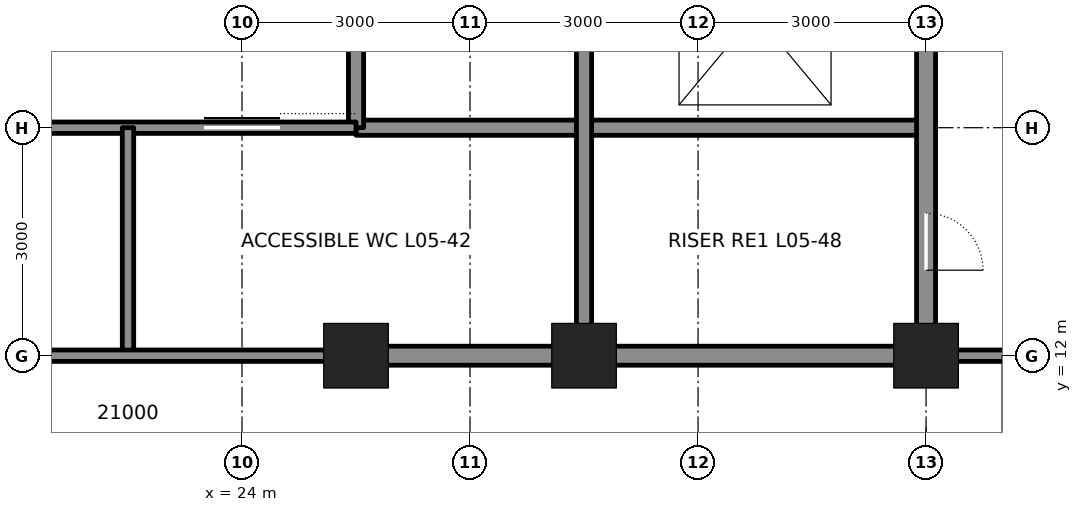
"""IFC4 building model, lengths in metres.
Left out: names, types, materials, properties, quantities, classifications, styles, units other than length and angle.
Written with IfcOpenShell. Run it as: python <this file> out.ifc"""

import sys

from ifc_helpers import new_model, si_unit, direction, frame, frame_2d, origin, origin_2d, place, context, subcontext, project, spatial, rectangle, hollow_rectangle, extrude, element, fill, save


model = new_model("IFC4")
c1 = context("Model", 3, precision=1e-05, world=origin(), true_north=direction((0.0, 1.0)))
c2 = subcontext(c1, "Body", "Model", "MODEL_VIEW")
j1 = project(units=[si_unit("LENGTHUNIT", "METRE"), si_unit("PLANEANGLEUNIT", "RADIAN")], contexts=[c1])
p1 = place(None, origin())
s1 = spatial("IfcSite", under=j1, at=p1, CompositionType="ELEMENT")
p2 = place(p1, origin())
s2 = spatial("IfcBuilding", under=s1, at=p2, CompositionType="ELEMENT")
p3 = place(p2, frame((0.0, 0.0, 28.8)))
s3 = spatial("IfcBuildingStorey", under=s2, at=p3, CompositionType="ELEMENT", Elevation=28.8)
for number, where, z_axis, x_axis in (
    (1, (25.5, 12.0, 0.0), (0.0, 0.0, 1.0), (1.0, 0.0, 0.0)),
    (2, (28.5, 12.0, 0.0), (0.0, 0.0, 1.0), (1.0, 0.0, 0.0)),
    (3, (33.0, 12.0, 0.0), (0.0, 0.0, 1.0), (1.0, 0.0, 0.0)),
):
    element("IfcColumn", number, at=place(p3, frame(where, z_axis=z_axis, x_axis=x_axis)), inside=s3, PredefinedType="COLUMN", context=c2, shape_type="SweptSolid", body=[
        extrude(hollow_rectangle(XDim=0.85, YDim=0.85, WallThickness=0.085, at=origin_2d()), origin(), (0.0, 0.0, 1.0), 4.5),
    ])
p4 = place(p3, frame((25.75, 12.0, 0.0), z_axis=(0.0, 0.0, 1.0), x_axis=(1.0, 0.0, 0.0)))
e4 = element("IfcWall", 4, at=p4, inside=s3, PredefinedType="SOLIDWALL", context=c2, shape_type="SweptSolid", body=[
    extrude(rectangle(XDim=2.5, YDim=0.25, at=frame_2d((1.25, 0.0))), origin(), (0.0, 0.0, 1.0), 3.181),
])
p5 = place(p3, frame((28.75, 12.0, 0.0), z_axis=(0.0, 0.0, 1.0), x_axis=(1.0, 0.0, 0.0)))
e5 = element("IfcWall", 5, at=p5, inside=s3, PredefinedType="SOLIDWALL", context=c2, shape_type="SweptSolid", body=[
    extrude(rectangle(XDim=4.0, YDim=0.25, at=frame_2d((2.0, 0.0))), origin(), (0.0, 0.0, 1.0), 3.181),
])
p6 = place(p3, frame((25.5, 15.0, 0.0), z_axis=(0.0, 0.0, 1.0), x_axis=(1.0, 0.0, 0.0)))
e6 = element("IfcWall", 6, at=p6, inside=s3, PredefinedType="SOLIDWALL", context=c2, shape_type="SweptSolid", body=[
    extrude(rectangle(XDim=7.5, YDim=0.2, at=frame_2d((3.75, 0.0))), origin(), (0.0, 0.0, 1.0), 4.34),
])
p7 = place(p3, frame((25.5, 15.0, 0.0), z_axis=(0.0, 0.0, 1.0), x_axis=(0.0, 1.0, 0.0)))
e7 = element("IfcWall", 7, at=p7, inside=s3, PredefinedType="SOLIDWALL", context=c2, shape_type="SweptSolid", body=[
    extrude(rectangle(XDim=12.0, YDim=0.2, at=frame_2d((6.0, 0.0))), origin(), (0.0, 0.0, 1.0), 3.365),
])
p8 = place(p3, frame((28.5, 12.25, 0.0), z_axis=(0.0, 0.0, 1.0), x_axis=(0.0, 1.0, 0.0)))
e8 = element("IfcWall", 8, at=p8, inside=s3, PredefinedType="SOLIDWALL", context=c2, shape_type="SweptSolid", body=[
    extrude(rectangle(XDim=8.5, YDim=0.2, at=frame_2d((4.25, 0.0))), origin(), (0.0, 0.0, 1.0), 3.413),
])
p9 = place(p3, frame((33.0, 12.25, 0.0), z_axis=(0.0, 0.0, 1.0), x_axis=(0.0, 1.0, 0.0)))
e9 = element("IfcWall", 9, at=p9, inside=s3, PredefinedType="SOLIDWALL", context=c2, shape_type="SweptSolid", body=[
    extrude(rectangle(XDim=8.5, YDim=0.25, at=frame_2d((4.25, 0.0))), origin(), (0.0, 0.0, 1.0), 3.113),
])
p10 = place(p9, frame((6.65, 0.0, 0.0)))
e10 = element("IfcOpeningElement", 10, at=p10, cuts=e9, PredefinedType="OPENING", context=c2, shape_type="SweptSolid", body=[
    extrude(rectangle(XDim=1.2, YDim=2.1, at=frame_2d((0.6, 1.05))), frame((0.0, 0.135, 0.0), z_axis=(0.0, -1.0, 0.0), x_axis=(1.0, 0.0, 0.0)), (0.0, 0.0, 1.0), 0.27),
])
p11 = place(p9, frame((0.875, 0.0, 0.0)))
e11 = element("IfcOpeningElement", 11, at=p11, cuts=e9, PredefinedType="OPENING", context=c2, shape_type="SweptSolid", body=[
    extrude(rectangle(XDim=0.75, YDim=2.1, at=frame_2d((0.375, 1.05))), frame((0.0, 0.135, 0.0), z_axis=(0.0, -1.0, 0.0), x_axis=(1.0, 0.0, 0.0)), (0.0, 0.0, 1.0), 0.27),
])
p12 = place(p3, frame((19.5, 15.0, 0.0), z_axis=(0.0, 0.0, 1.0), x_axis=(1.0, 0.0, 0.0)))
e12 = element("IfcWall", 12, at=p12, inside=s3, PredefinedType="PARTITIONING", context=c2, shape_type="SweptSolid", body=[
    extrude(rectangle(XDim=6.0, YDim=0.15, at=frame_2d((3.0, 0.0))), origin(), (0.0, 0.0, 1.0), 4.34),
])
p13 = place(p12, frame((4.0, 0.0, 0.0)))
e13 = element("IfcOpeningElement", 13, at=p13, cuts=e12, PredefinedType="OPENING", context=c2, shape_type="SweptSolid", body=[
    extrude(rectangle(XDim=1.0, YDim=2.1, at=frame_2d((0.5, 1.05))), frame((0.0, 0.085, 0.0), z_axis=(0.0, -1.0, 0.0), x_axis=(1.0, 0.0, 0.0)), (0.0, 0.0, 1.0), 0.17),
])
p14 = place(p12, frame((1.05, 0.0, 0.0)))
e14 = element("IfcOpeningElement", 14, at=p14, cuts=e12, PredefinedType="OPENING", context=c2, shape_type="SweptSolid", body=[
    extrude(rectangle(XDim=0.9, YDim=2.1, at=frame_2d((0.45, 1.05))), frame((0.0, 0.085, 0.0), z_axis=(0.0, -1.0, 0.0), x_axis=(1.0, 0.0, 0.0)), (0.0, 0.0, 1.0), 0.17),
])
p15 = place(p3, frame((22.5, 15.0, 0.0), z_axis=(0.0, 0.0, 1.0), x_axis=(0.0, -1.0, 0.0)))
e15 = element("IfcWall", 15, at=p15, inside=s3, PredefinedType="PARTITIONING", context=c2, shape_type="SweptSolid", body=[
    extrude(rectangle(XDim=3.0, YDim=0.15, at=frame_2d((1.5, 0.0))), origin(), (0.0, 0.0, 1.0), 4.34),
])
p16 = place(p3, frame((19.5, 12.0, 0.0), z_axis=(0.0, 0.0, 1.0), x_axis=(1.0, 0.0, 0.0)))
e16 = element("IfcWall", 16, at=p16, inside=s3, PredefinedType="PARTITIONING", context=c2, shape_type="SweptSolid", body=[
    extrude(rectangle(XDim=6.0, YDim=0.15, at=frame_2d((3.0, 0.0))), origin(), (0.0, 0.0, 1.0), 3.181),
])
p17 = place(p3, frame((33.0, 12.0, -0.3), z_axis=(0.0, 0.0, 1.0), x_axis=(1.0, 0.0, 0.0)))
e17 = element("IfcWall", 17, at=p17, inside=s3, PredefinedType="PARTITIONING", context=c2, shape_type="SweptSolid", body=[
    extrude(rectangle(XDim=3.0, YDim=0.15, at=frame_2d((1.5, 0.0))), origin(), (0.0, 0.0, 1.0), 3.481),
])
p18 = place(p17, frame((1.0, 0.0, 0.3)))
e18 = element("IfcOpeningElement", 18, at=p18, cuts=e17, PredefinedType="OPENING", context=c2, shape_type="SweptSolid", body=[
    extrude(rectangle(XDim=1.0, YDim=2.4, at=frame_2d((0.5, 1.2))), frame((0.0, 0.085, 0.0), z_axis=(0.0, -1.0, 0.0), x_axis=(1.0, 0.0, 0.0)), (0.0, 0.0, 1.0), 0.17),
])
p19 = place(p11, frame((0.75, 0.0, 0.0), z_axis=(0.0, 0.0, 1.0), x_axis=(-1.0, 0.0, 0.0)))
e19 = element("IfcDoor", 19, at=p19, inside=s3, OperationType="SINGLE_SWING_RIGHT", PredefinedType="DOOR", context=c2, shape_type="SweptSolid", body=[
    extrude(rectangle(XDim=0.75, YDim=2.1, at=frame_2d((0.375, 1.05))), frame((0.0, 0.025, 0.0), z_axis=(0.0, -1.0, 0.0), x_axis=(1.0, 0.0, 0.0)), (0.0, 0.0, 1.0), 0.05),
])
fill(e11, e19)
p20 = place(p13, origin())
e20 = element("IfcDoor", 20, at=p20, inside=s3, OperationType="SLIDING_TO_LEFT", PredefinedType="DOOR", context=c2, shape_type="SweptSolid", body=[
    extrude(rectangle(XDim=1.0, YDim=2.1, at=frame_2d((0.5, 1.05))), frame((0.0, 0.025, 0.0), z_axis=(0.0, -1.0, 0.0), x_axis=(1.0, 0.0, 0.0)), (0.0, 0.0, 1.0), 0.05),
])
fill(e13, e20)
save(model, sys.argv[1])
